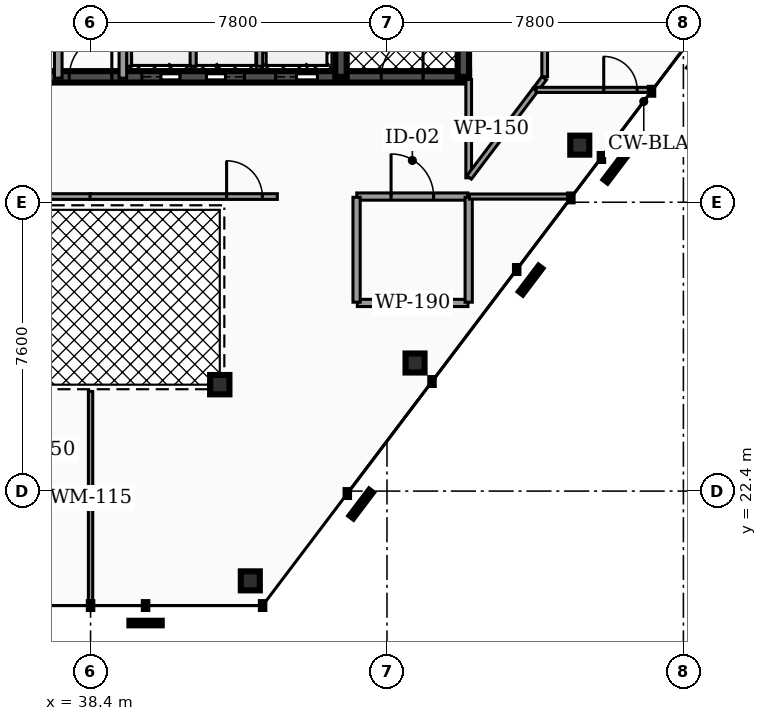
"""IFC4 building model, lengths in metres.
Left out: names, types, materials, properties, quantities, classifications, styles, units other than length and angle.
Written with IfcOpenShell. Run it as: python <this file> out.ifc"""

import sys

from ifc_helpers import new_model, si_unit, direction, frame, frame_2d, origin, origin_2d, place, context, subcontext, project, spatial, rectangle, hollow_rectangle, hollow_circle, extrude, element, fill, save


model = new_model("IFC4")
c1 = context("Model", 3, precision=1e-05, world=origin(), true_north=direction((0.0, 1.0)))
c2 = subcontext(c1, "Body", "Model", "MODEL_VIEW")
j1 = project(units=[si_unit("LENGTHUNIT", "METRE"), si_unit("PLANEANGLEUNIT", "RADIAN")], contexts=[c1])
p1 = place(None, origin())
s1 = spatial("IfcSite", under=j1, at=p1, CompositionType="ELEMENT")
p2 = place(p1, origin())
s2 = spatial("IfcBuilding", under=s1, at=p2, CompositionType="ELEMENT")
p3 = place(p2, frame((0.0, 0.0, 268.6)))
s3 = spatial("IfcBuildingStorey", under=s2, at=p3, CompositionType="ELEMENT", Elevation=268.6)
p4 = place(p3, frame((28.5, 33.3, 0.0), z_axis=(0.0, 0.0, 1.0), x_axis=(1.0, 0.0, 0.0)))
e1 = element("IfcWall", 1, at=p4, inside=s3, PredefinedType="SHEAR", context=c2, shape_type="SweptSolid", body=[
    extrude(rectangle(XDim=19.86, YDim=0.3, at=frame_2d((9.93, 0.0))), origin(), (0.0, 0.0, 1.0), 3.18),
])
p5 = place(p4, frame((3.93, 0.0, 0.0)))
e2 = element("IfcOpeningElement", 2, at=p5, cuts=e1, PredefinedType="OPENING", context=c2, shape_type="SweptSolid", body=[
    extrude(rectangle(XDim=1.1, YDim=2.15, at=frame_2d((0.55, 1.075))), frame((0.0, 0.16, 0.0), z_axis=(0.0, -1.0, 0.0), x_axis=(1.0, 0.0, 0.0)), (0.0, 0.0, 1.0), 0.32),
])
p6 = place(p4, frame((14.77, 0.0, 0.0)))
e3 = element("IfcOpeningElement", 3, at=p6, cuts=e1, PredefinedType="OPENING", context=c2, shape_type="SweptSolid", body=[
    extrude(rectangle(XDim=1.1, YDim=2.15, at=frame_2d((0.55, 1.075))), frame((0.0, 0.16, 0.0), z_axis=(0.0, -1.0, 0.0), x_axis=(1.0, 0.0, 0.0)), (0.0, 0.0, 1.0), 0.32),
])
p7 = place(p4, frame((11.25, 0.0, 0.0)))
e4 = element("IfcOpeningElement", 4, at=p7, cuts=e1, PredefinedType="OPENING", context=c2, shape_type="SweptSolid", body=[
    extrude(rectangle(XDim=1.0, YDim=2.1, at=frame_2d((0.5, 1.05))), frame((0.0, 0.16, 0.0), z_axis=(0.0, -1.0, 0.0), x_axis=(1.0, 0.0, 0.0)), (0.0, 0.0, 1.0), 0.32),
])
p8 = place(p4, frame((12.95, 0.0, 0.0)))
e5 = element("IfcOpeningElement", 5, at=p8, cuts=e1, PredefinedType="OPENING", context=c2, shape_type="SweptSolid", body=[
    extrude(rectangle(XDim=1.0, YDim=2.1, at=frame_2d((0.5, 1.05))), frame((0.0, 0.16, 0.0), z_axis=(0.0, -1.0, 0.0), x_axis=(1.0, 0.0, 0.0)), (0.0, 0.0, 1.0), 0.32),
])
p9 = place(p4, frame((5.85, 0.0, 0.0)))
e6 = element("IfcOpeningElement", 6, at=p9, cuts=e1, PredefinedType="OPENING", context=c2, shape_type="SweptSolid", body=[
    extrude(rectangle(XDim=1.0, YDim=2.1, at=frame_2d((0.5, 1.05))), frame((0.0, 0.16, 0.0), z_axis=(0.0, -1.0, 0.0), x_axis=(1.0, 0.0, 0.0)), (0.0, 0.0, 1.0), 0.32),
])
p10 = place(p4, frame((1.21, 0.0, 0.0)))
e7 = element("IfcOpeningElement", 7, at=p10, cuts=e1, PredefinedType="OPENING", context=c2, shape_type="SweptSolid", body=[
    extrude(rectangle(XDim=1.1, YDim=2.2, at=frame_2d((0.55, 1.1))), frame((0.0, 0.16, 0.0), z_axis=(0.0, -1.0, 0.0), x_axis=(1.0, 0.0, 0.0)), (0.0, 0.0, 1.0), 0.32),
])
p11 = place(p4, frame((9.34, 0.0, 0.0)))
e8 = element("IfcOpeningElement", 8, at=p11, cuts=e1, PredefinedType="OPENING", context=c2, shape_type="SweptSolid", body=[
    extrude(rectangle(XDim=1.12, YDim=2.05, at=frame_2d((0.56, 1.025))), frame((0.0, 0.16, 0.0), z_axis=(0.0, -1.0, 0.0), x_axis=(1.0, 0.0, 0.0)), (0.0, 0.0, 1.0), 0.32),
])
p12 = place(p4, frame((17.55, 0.0, 0.0)))
e9 = element("IfcOpeningElement", 9, at=p12, cuts=e1, PredefinedType="OPENING", context=c2, shape_type="SweptSolid", body=[
    extrude(rectangle(XDim=1.1, YDim=2.2, at=frame_2d((0.55, 1.1))), frame((0.0, 0.16, 0.0), z_axis=(0.0, -1.0, 0.0), x_axis=(1.0, 0.0, 0.0)), (0.0, 0.0, 1.0), 0.32),
])
for number, where, z_axis, x_axis in (
    (10, (44.99, 33.3, 0.0), (0.0, 0.0, 1.0), (0.0, 1.0, 0.0)),
    (11, (48.21, 33.3, 0.0), (0.0, 0.0, 1.0), (0.0, 1.0, 0.0)),
):
    element("IfcWall", number, at=place(p3, frame(where, z_axis=z_axis, x_axis=x_axis)), inside=s3, PredefinedType="SHEAR", context=c2, shape_type="SweptSolid", body=[
        extrude(rectangle(XDim=10.1, YDim=0.3, at=frame_2d((5.05, 0.0))), origin(), (0.0, 0.0, 1.0), 3.18),
    ])
for number, where, z_axis, x_axis in (
    (12, (42.604, 20.038, 0.0), (0.0, 0.0, 1.0), (1.0, 0.0, 0.0)),
    (13, (46.938, 25.77, 0.0), (0.0, 0.0, 1.0), (1.0, 0.0, 0.0)),
    (14, (51.273, 31.502, 0.0), (0.0, 0.0, 1.0), (1.0, 0.0, 0.0)),
):
    element("IfcColumn", number, at=place(p3, frame(where, z_axis=z_axis, x_axis=x_axis)), inside=s3, PredefinedType="COLUMN", context=c2, shape_type="SweptSolid", body=[
        extrude(hollow_rectangle(XDim=0.5, YDim=0.5, WallThickness=0.025, at=origin_2d()), origin(), (0.0, 0.0, 1.0), 3.18),
    ])
p13 = place(p3, frame((41.8, 25.2, 0.0), z_axis=(0.0, 0.0, 1.0), x_axis=(1.0, 0.0, 0.0)))
e15 = element("IfcColumn", 15, at=p13, inside=s3, PredefinedType="COLUMN", context=c2, shape_type="SweptSolid", body=[
    extrude(hollow_circle(Radius=0.254, WallThickness=0.02, at=origin_2d()), origin(), (0.0, 0.0, 1.0), 3.18),
])
p14 = place(p3, frame((42.85, 33.58, 0.0), z_axis=(0.0, 0.0, 1.0), x_axis=(0.0, 1.0, 0.0)))
e16 = element("IfcWall", 16, at=p14, inside=s3, PredefinedType="SOLIDWALL", context=c2, shape_type="SweptSolid", body=[
    extrude(rectangle(XDim=2.45, YDim=0.16, at=frame_2d((1.225, 0.0))), origin(), (0.0, 0.0, 1.0), 3.18),
])
for number, where, z_axis, x_axis in (
    (17, (39.4, 33.58, 0.0), (0.0, 0.0, 1.0), (0.0, 1.0, 0.0)),
    (18, (41.1, 33.58, 0.0), (0.0, 0.0, 1.0), (0.0, 1.0, 0.0)),
):
    element("IfcWall", number, at=place(p3, frame(where, z_axis=z_axis, x_axis=x_axis)), inside=s3, PredefinedType="SOLIDWALL", context=c2, shape_type="SweptSolid", body=[
        extrude(rectangle(XDim=2.25, YDim=0.16, at=frame_2d((1.125, 0.0))), origin(), (0.0, 0.0, 1.0), 3.18),
    ])
p15 = place(p3, frame((37.55, 33.265, 0.0), z_axis=(0.0, 0.0, 1.0), x_axis=(0.0, 1.0, 0.0)))
e19 = element("IfcWall", 19, at=p15, inside=s3, PredefinedType="PARTITIONING", context=c2, shape_type="SweptSolid", body=[
    extrude(rectangle(XDim=3.615, YDim=0.2, at=frame_2d((1.808, 0.0))), origin(), (0.0, 0.0, 1.0), 2.235),
])
p16 = place(p15, frame((1.367, 0.0, 0.0)))
e20 = element("IfcOpeningElement", 20, at=p16, cuts=e19, PredefinedType="OPENING", context=c2, shape_type="SweptSolid", body=[
    extrude(rectangle(XDim=0.88, YDim=2.05, at=frame_2d((0.44, 1.025))), frame((0.0, 0.11, 0.0), z_axis=(0.0, -1.0, 0.0), x_axis=(1.0, 0.0, 0.0)), (0.0, 0.0, 1.0), 0.22),
])
p17 = place(p3, frame((39.25, 33.265, 0.0), z_axis=(0.0, 0.0, 1.0), x_axis=(0.0, 1.0, 0.0)))
e21 = element("IfcWall", 21, at=p17, inside=s3, PredefinedType="PARTITIONING", context=c2, shape_type="SweptSolid", body=[
    extrude(rectangle(XDim=3.615, YDim=0.2, at=frame_2d((1.808, 0.0))), origin(), (0.0, 0.0, 1.0), 2.235),
])
p18 = place(p3, frame((45.405, 30.15, 0.0), z_axis=(0.0, 0.0, 1.0), x_axis=(1.0, 0.0, 0.0)))
e22 = element("IfcWall", 22, at=p18, inside=s3, PredefinedType="PARTITIONING", context=c2, shape_type="SweptSolid", body=[
    extrude(rectangle(XDim=2.925, YDim=0.19, at=frame_2d((1.462, 0.0))), origin(), (0.0, 0.0, 1.0), 2.235),
])
p19 = place(p18, frame((0.903, 0.0, 0.0)))
e23 = element("IfcOpeningElement", 23, at=p19, cuts=e22, PredefinedType="OPENING", context=c2, shape_type="SweptSolid", body=[
    extrude(rectangle(XDim=1.12, YDim=2.05, at=frame_2d((0.56, 1.025))), frame((0.0, 0.105, 0.0), z_axis=(0.0, -1.0, 0.0), x_axis=(1.0, 0.0, 0.0)), (0.0, 0.0, 1.0), 0.21),
])
p20 = place(p3, frame((48.35, 30.643, 0.0), z_axis=(0.0, 0.0, 1.0), x_axis=(0.0, 1.0, 0.0)))
e24 = element("IfcWall", 24, at=p20, inside=s3, PredefinedType="PARTITIONING", context=c2, shape_type="SweptSolid", body=[
    extrude(rectangle(XDim=2.587, YDim=0.15, at=frame_2d((1.294, 0.0))), origin(), (0.0, 0.0, 1.0), 2.235),
])
p21 = place(p3, frame((33.485, 30.15, 0.0), z_axis=(0.0, 0.0, 1.0), x_axis=(1.0, 0.0, 0.0)))
e25 = element("IfcWall", 25, at=p21, inside=s3, PredefinedType="PARTITIONING", context=c2, shape_type="SweptSolid", body=[
    extrude(rectangle(XDim=4.93, YDim=0.15, at=frame_2d((2.465, 0.0))), origin(), (0.0, 0.0, 1.0), 2.235),
])
p22 = place(p21, frame((0.395, 0.0, 0.0)))
e26 = element("IfcOpeningElement", 26, at=p22, cuts=e25, PredefinedType="OPENING", context=c2, shape_type="SweptSolid", body=[
    extrude(rectangle(XDim=0.94, YDim=2.05, at=frame_2d((0.47, 1.025))), frame((0.0, 0.085, 0.0), z_axis=(0.0, -1.0, 0.0), x_axis=(1.0, 0.0, 0.0)), (0.0, 0.0, 1.0), 0.17),
])
p23 = place(p3, frame((38.385, 30.15, 0.0), z_axis=(0.0, 0.0, 1.0), x_axis=(1.0, 0.0, 0.0)))
e27 = element("IfcWall", 27, at=p23, inside=s3, PredefinedType="PARTITIONING", context=c2, shape_type="SweptSolid", body=[
    extrude(rectangle(XDim=4.93, YDim=0.15, at=frame_2d((2.465, 0.0))), origin(), (0.0, 0.0, 1.0), 2.235),
])
p24 = place(p23, frame((3.595, 0.0, 0.0)))
e28 = element("IfcOpeningElement", 28, at=p24, cuts=e27, PredefinedType="OPENING", context=c2, shape_type="SweptSolid", body=[
    extrude(rectangle(XDim=0.94, YDim=2.05, at=frame_2d((0.47, 1.025))), frame((0.0, 0.085, 0.0), z_axis=(0.0, -1.0, 0.0), x_axis=(1.0, 0.0, 0.0)), (0.0, 0.0, 1.0), 0.17),
])
p25 = place(p3, frame((45.42, 27.35, 0.0), z_axis=(0.0, 0.0, 1.0), x_axis=(1.0, 0.0, 0.0)))
e29 = element("IfcWall", 29, at=p25, inside=s3, PredefinedType="PARTITIONING", context=c2, shape_type="SweptSolid", body=[
    extrude(rectangle(XDim=2.91, YDim=0.19, at=frame_2d((1.455, 0.0))), origin(), (0.0, 0.0, 1.0), 2.235),
])
for number, where, z_axis, x_axis in (
    (30, (45.4, 27.37, 0.0), (0.0, 0.0, 1.0), (0.0, 1.0, 0.0)),
    (31, (48.35, 27.37, 0.0), (0.0, 0.0, 1.0), (0.0, 1.0, 0.0)),
):
    element("IfcWall", number, at=place(p3, frame(where, z_axis=z_axis, x_axis=x_axis)), inside=s3, PredefinedType="PARTITIONING", context=c2, shape_type="SweptSolid", body=[
        extrude(rectangle(XDim=2.76, YDim=0.19, at=frame_2d((1.38, 0.0))), origin(), (0.0, 0.0, 1.0), 2.235),
    ])
p26 = place(p3, frame((50.35, 33.302, 0.0), z_axis=(0.0, 0.0, 1.0), x_axis=(0.0, 1.0, 0.0)))
e32 = element("IfcWall", 32, at=p26, inside=s3, PredefinedType="PARTITIONING", context=c2, shape_type="SweptSolid", body=[
    extrude(rectangle(XDim=10.248, YDim=0.15, at=frame_2d((5.124, 0.0))), origin(), (0.0, 0.0, 1.0), 2.235),
])
p27 = place(p26, frame((4.654, 0.0, 0.0)))
e33 = element("IfcOpeningElement", 33, at=p27, cuts=e32, PredefinedType="OPENING", context=c2, shape_type="SweptSolid", body=[
    extrude(rectangle(XDim=0.94, YDim=2.05, at=frame_2d((0.47, 1.025))), frame((0.0, 0.085, 0.0), z_axis=(0.0, -1.0, 0.0), x_axis=(1.0, 0.0, 0.0)), (0.0, 0.0, 1.0), 0.17),
])
p28 = place(p3, frame((50.107, 32.96, 0.0), z_axis=(0.0, 0.0, 1.0), x_axis=(0.602950173728, 0.797778846549, 0.0)))
e34 = element("IfcWall", 34, at=p28, inside=s3, PredefinedType="PARTITIONING", context=c2, shape_type="SweptSolid", body=[
    extrude(rectangle(XDim=0.384, YDim=0.15, at=frame_2d((0.192, 0.0))), origin(), (0.0, 0.0, 1.0), 2.235),
])
p29 = place(p3, frame((48.362, 30.654, 0.0), z_axis=(0.0, 0.0, 1.0), x_axis=(0.603189668488, 0.79759778324, 0.0)))
e35 = element("IfcWall", 35, at=p29, inside=s3, PredefinedType="PARTITIONING", context=c2, shape_type="SweptSolid", body=[
    extrude(rectangle(XDim=2.886, YDim=0.15, at=frame_2d((1.443, 0.0))), origin(), (0.0, 0.0, 1.0), 2.235),
])
p30 = place(p3, frame((38.4, 19.403, 0.0), z_axis=(0.0, 0.0, 1.0), x_axis=(0.0, 1.0, 0.0)))
e36 = element("IfcWall", 36, at=p30, inside=s3, PredefinedType="MOVABLE", context=c2, shape_type="SweptSolid", body=[
    extrude(rectangle(XDim=5.617, YDim=0.115, at=frame_2d((2.809, 0.0))), origin(), (0.0, 0.0, 1.0), 2.235),
])
p31 = place(p3, frame((48.37, 30.15, 0.0), z_axis=(0.0, 0.0, 1.0), x_axis=(1.0, 0.0, 0.0)))
e37 = element("IfcWall", 37, at=p31, inside=s3, PredefinedType="PARTITIONING", context=c2, shape_type="SweptSolid", body=[
    extrude(rectangle(XDim=2.68, YDim=0.135, at=frame_2d((1.34, 0.0))), origin(), (0.0, 0.0, 1.0), 2.235),
])
p32 = place(p3, frame((50.124, 32.956, 0.0), z_axis=(0.0, 0.0, 1.0), x_axis=(1.0, 0.0, 0.0)))
e38 = element("IfcWall", 38, at=p32, inside=s3, PredefinedType="PARTITIONING", context=c2, shape_type="SweptSolid", body=[
    extrude(rectangle(XDim=3.049, YDim=0.135, at=frame_2d((1.525, 0.0))), origin(), (0.0, 0.0, 1.0), 2.235),
])
p33 = place(p32, frame((1.78, 0.0, 0.0)))
e39 = element("IfcOpeningElement", 39, at=p33, cuts=e38, PredefinedType="OPENING", context=c2, shape_type="SweptSolid", body=[
    extrude(rectangle(XDim=0.88, YDim=2.05, at=frame_2d((0.44, 1.025))), frame((0.0, 0.077, 0.0), z_axis=(0.0, -1.0, 0.0), x_axis=(1.0, 0.0, 0.0)), (0.0, 0.0, 1.0), 0.155),
])
p34 = place(p6, origin())
e40 = element("IfcDoor", 40, at=p34, inside=s3, OperationType="SLIDING_TO_RIGHT", PredefinedType="DOOR", context=c2, shape_type="SweptSolid", body=[
    extrude(rectangle(XDim=1.1, YDim=2.15, at=frame_2d((0.55, 1.075))), frame((0.0, 0.025, 0.0), z_axis=(0.0, -1.0, 0.0), x_axis=(1.0, 0.0, 0.0)), (0.0, 0.0, 1.0), 0.05),
])
fill(e3, e40)
p35 = place(p7, origin())
e41 = element("IfcDoor", 41, at=p35, inside=s3, OperationType="SLIDING_TO_RIGHT", PredefinedType="DOOR", context=c2, shape_type="SweptSolid", body=[
    extrude(rectangle(XDim=1.0, YDim=2.1, at=frame_2d((0.5, 1.05))), frame((0.0, 0.025, 0.0), z_axis=(0.0, -1.0, 0.0), x_axis=(1.0, 0.0, 0.0)), (0.0, 0.0, 1.0), 0.05),
])
fill(e4, e41)
p36 = place(p8, origin())
e42 = element("IfcDoor", 42, at=p36, inside=s3, OperationType="SLIDING_TO_LEFT", PredefinedType="DOOR", context=c2, shape_type="SweptSolid", body=[
    extrude(rectangle(XDim=1.0, YDim=2.1, at=frame_2d((0.5, 1.05))), frame((0.0, 0.025, 0.0), z_axis=(0.0, -1.0, 0.0), x_axis=(1.0, 0.0, 0.0)), (0.0, 0.0, 1.0), 0.05),
])
fill(e5, e42)
p37 = place(p11, origin())
e43 = element("IfcDoor", 43, at=p37, inside=s3, OperationType="SINGLE_SWING_RIGHT", PredefinedType="DOOR", context=c2, shape_type="SweptSolid", body=[
    extrude(rectangle(XDim=1.12, YDim=2.05, at=frame_2d((0.56, 1.025))), frame((0.0, 0.025, 0.0), z_axis=(0.0, -1.0, 0.0), x_axis=(1.0, 0.0, 0.0)), (0.0, 0.0, 1.0), 0.05),
])
fill(e8, e43)
p38 = place(p12, origin())
e44 = element("IfcDoor", 44, at=p38, inside=s3, OperationType="SINGLE_SWING_RIGHT", PredefinedType="DOOR", context=c2, shape_type="SweptSolid", body=[
    extrude(rectangle(XDim=1.1, YDim=2.2, at=frame_2d((0.55, 1.1))), frame((0.0, 0.025, 0.0), z_axis=(0.0, -1.0, 0.0), x_axis=(1.0, 0.0, 0.0)), (0.0, 0.0, 1.0), 0.05),
])
fill(e9, e44)
p39 = place(p19, origin())
e45 = element("IfcDoor", 45, at=p39, inside=s3, OperationType="SINGLE_SWING_LEFT", PredefinedType="DOOR", context=c2, shape_type="SweptSolid", body=[
    extrude(rectangle(XDim=1.12, YDim=2.05, at=frame_2d((0.56, 1.025))), frame((0.0, 0.025, 0.0), z_axis=(0.0, -1.0, 0.0), x_axis=(1.0, 0.0, 0.0)), (0.0, 0.0, 1.0), 0.05),
])
fill(e23, e45)
p40 = place(p24, origin())
e46 = element("IfcDoor", 46, at=p40, inside=s3, OperationType="SINGLE_SWING_LEFT", PredefinedType="DOOR", context=c2, shape_type="SweptSolid", body=[
    extrude(rectangle(XDim=0.94, YDim=2.05, at=frame_2d((0.47, 1.025))), frame((0.0, 0.025, 0.0), z_axis=(0.0, -1.0, 0.0), x_axis=(1.0, 0.0, 0.0)), (0.0, 0.0, 1.0), 0.05),
])
fill(e28, e46)
p41 = place(p33, origin())
e47 = element("IfcDoor", 47, at=p41, inside=s3, OperationType="SINGLE_SWING_LEFT", PredefinedType="DOOR", context=c2, shape_type="SweptSolid", body=[
    extrude(rectangle(XDim=0.88, YDim=2.05, at=frame_2d((0.44, 1.025))), frame((0.0, 0.025, 0.0), z_axis=(0.0, -1.0, 0.0), x_axis=(1.0, 0.0, 0.0)), (0.0, 0.0, 1.0), 0.05),
])
fill(e39, e47)
save(model, sys.argv[1])
